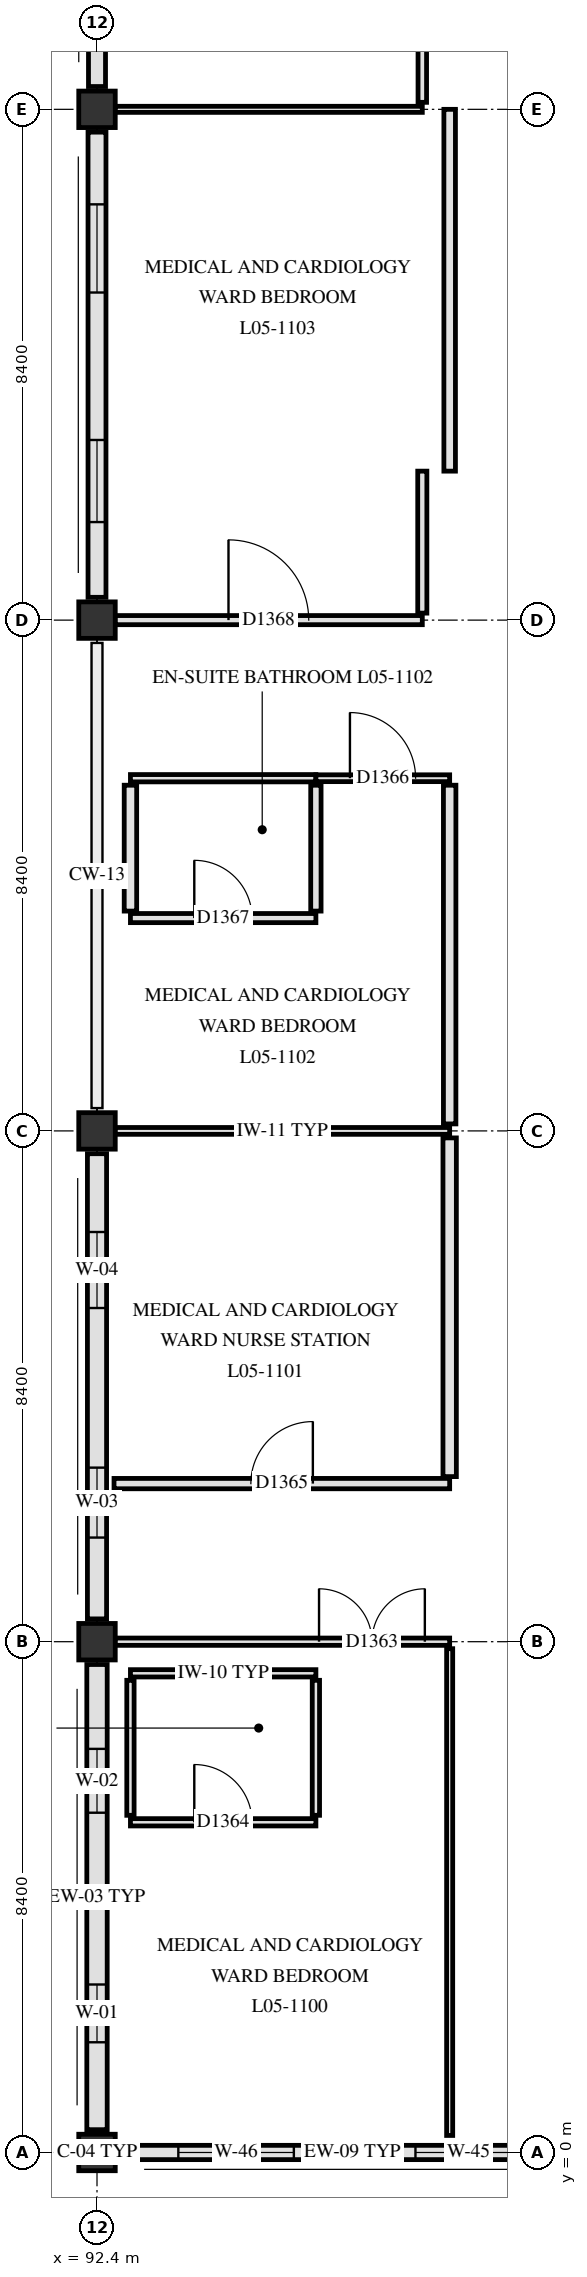
"""IFC4 building model, lengths in metres.
Left out: names, types, materials, properties, quantities, classifications, styles, units other than length and angle.
Written with IfcOpenShell. Run it as: python <this file> out.ifc"""

import sys

from ifc_helpers import new_model, si_unit, direction, frame, frame_2d, origin, origin_2d, place, context, subcontext, project, spatial, rectangle, extrude, element, fill, save


model = new_model("IFC4")
c1 = context("Model", 3, precision=1e-05, world=origin(), true_north=direction((0.0, 1.0)))
c2 = subcontext(c1, "Body", "Model", "MODEL_VIEW")
j1 = project(units=[si_unit("LENGTHUNIT", "METRE"), si_unit("PLANEANGLEUNIT", "RADIAN")], contexts=[c1])
p1 = place(None, origin())
s1 = spatial("IfcSite", under=j1, at=p1, CompositionType="ELEMENT")
p2 = place(p1, origin())
s2 = spatial("IfcBuilding", under=s1, at=p2, CompositionType="ELEMENT")
p3 = place(p2, frame((0.0, 0.0, 22.5)))
s3 = spatial("IfcBuildingStorey", under=s2, at=p3, CompositionType="ELEMENT", Elevation=22.5)
for number, where, z_axis, x_axis in (
    (1, (92.4, 0.0, 0.0), (0.0, 0.0, 1.0), (1.0, 0.0, 0.0)),
    (2, (92.4, 8.4, 0.0), (0.0, 0.0, 1.0), (1.0, 0.0, 0.0)),
    (3, (92.4, 16.8, 0.0), (0.0, 0.0, 1.0), (1.0, 0.0, 0.0)),
    (4, (92.4, 25.2, 0.0), (0.0, 0.0, 1.0), (1.0, 0.0, 0.0)),
    (5, (92.4, 33.6, 0.0), (0.0, 0.0, 1.0), (1.0, 0.0, 0.0)),
):
    element("IfcColumn", number, at=place(p3, frame(where, z_axis=z_axis, x_axis=x_axis)), inside=s3, PredefinedType="COLUMN", context=c2, shape_type="SweptSolid", body=[
        extrude(rectangle(XDim=0.6, YDim=0.6, at=origin_2d()), origin(), (0.0, 0.0, 1.0), 3.9),
    ])
p4 = place(p3, frame((100.425, 0.0, 0.0), z_axis=(0.0, 0.0, 1.0), x_axis=(-1.0, 0.0, 0.0)))
e6 = element("IfcWall", 6, at=p4, inside=s3, PredefinedType="SOLIDWALL", context=c2, shape_type="SweptSolid", body=[
    extrude(rectangle(XDim=7.65, YDim=0.235, at=frame_2d((3.825, 0.0))), origin(), (0.0, 0.0, 1.0), 3.31),
])
p5 = place(p4, frame((1.038, 0.0, 0.85)))
e7 = element("IfcOpeningElement", 7, at=p5, cuts=e6, PredefinedType="OPENING", context=c2, shape_type="SweptSolid", body=[
    extrude(rectangle(XDim=1.75, YDim=1.78, at=frame_2d((0.875, 0.89))), frame((0.0, 0.127, 0.0), z_axis=(0.0, -1.0, 0.0), x_axis=(1.0, 0.0, 0.0)), (0.0, 0.0, 1.0), 0.255),
])
p6 = place(p4, frame((4.788, 0.0, 0.85)))
e8 = element("IfcOpeningElement", 8, at=p6, cuts=e6, PredefinedType="OPENING", context=c2, shape_type="SweptSolid", body=[
    extrude(rectangle(XDim=1.9, YDim=1.78, at=frame_2d((0.95, 0.89))), frame((0.0, 0.127, 0.0), z_axis=(0.0, -1.0, 0.0), x_axis=(1.0, 0.0, 0.0)), (0.0, 0.0, 1.0), 0.255),
])
p7 = place(p3, frame((92.4, 0.375, 0.0), z_axis=(0.0, 0.0, 1.0), x_axis=(0.0, 1.0, 0.0)))
e9 = element("IfcWall", 9, at=p7, inside=s3, PredefinedType="SOLIDWALL", context=c2, shape_type="SweptSolid", body=[
    extrude(rectangle(XDim=7.65, YDim=0.335, at=frame_2d((3.825, 0.0))), origin(), (0.0, 0.0, 1.0), 3.34),
])
p8 = place(p7, frame((1.438, 0.0, 0.85)))
e10 = element("IfcOpeningElement", 10, at=p8, cuts=e9, PredefinedType="OPENING", context=c2, shape_type="SweptSolid", body=[
    extrude(rectangle(XDim=0.95, YDim=1.3, at=frame_2d((0.475, 0.65))), frame((0.0, 0.177, 0.0), z_axis=(0.0, -1.0, 0.0), x_axis=(1.0, 0.0, 0.0)), (0.0, 0.0, 1.0), 0.355),
])
p9 = place(p7, frame((5.212, 0.0, 0.85)))
e11 = element("IfcOpeningElement", 11, at=p9, cuts=e9, PredefinedType="OPENING", context=c2, shape_type="SweptSolid", body=[
    extrude(rectangle(XDim=1.05, YDim=1.3, at=frame_2d((0.525, 0.65))), frame((0.0, 0.177, 0.0), z_axis=(0.0, -1.0, 0.0), x_axis=(1.0, 0.0, 0.0)), (0.0, 0.0, 1.0), 0.355),
])
p10 = place(p3, frame((92.4, 8.775, 0.0), z_axis=(0.0, 0.0, 1.0), x_axis=(0.0, 1.0, 0.0)))
e12 = element("IfcWall", 12, at=p10, inside=s3, PredefinedType="SOLIDWALL", context=c2, shape_type="SweptSolid", body=[
    extrude(rectangle(XDim=7.65, YDim=0.315, at=frame_2d((3.825, 0.0))), origin(), (0.0, 0.0, 1.0), 3.34),
])
p11 = place(p10, frame((1.337, 0.0, 0.85)))
e13 = element("IfcOpeningElement", 13, at=p11, cuts=e12, PredefinedType="OPENING", context=c2, shape_type="SweptSolid", body=[
    extrude(rectangle(XDim=1.15, YDim=1.3, at=frame_2d((0.575, 0.65))), frame((0.0, 0.167, 0.0), z_axis=(0.0, -1.0, 0.0), x_axis=(1.0, 0.0, 0.0)), (0.0, 0.0, 1.0), 0.335),
])
p12 = place(p10, frame((5.113, 0.0, 0.85)))
e14 = element("IfcOpeningElement", 14, at=p12, cuts=e12, PredefinedType="OPENING", context=c2, shape_type="SweptSolid", body=[
    extrude(rectangle(XDim=1.25, YDim=1.3, at=frame_2d((0.625, 0.65))), frame((0.0, 0.167, 0.0), z_axis=(0.0, -1.0, 0.0), x_axis=(1.0, 0.0, 0.0)), (0.0, 0.0, 1.0), 0.335),
])
p13 = place(p3, frame((92.4, 25.575, 0.0), z_axis=(0.0, 0.0, 1.0), x_axis=(0.0, 1.0, 0.0)))
e15 = element("IfcWall", 15, at=p13, inside=s3, PredefinedType="SOLIDWALL", context=c2, shape_type="SweptSolid", body=[
    extrude(rectangle(XDim=7.65, YDim=0.295, at=frame_2d((3.825, 0.0))), origin(), (0.0, 0.0, 1.0), 3.34),
])
p14 = place(p13, frame((1.238, 0.0, 0.85)))
e16 = element("IfcOpeningElement", 16, at=p14, cuts=e15, PredefinedType="OPENING", context=c2, shape_type="SweptSolid", body=[
    extrude(rectangle(XDim=1.35, YDim=1.3, at=frame_2d((0.675, 0.65))), frame((0.0, 0.157, 0.0), z_axis=(0.0, -1.0, 0.0), x_axis=(1.0, 0.0, 0.0)), (0.0, 0.0, 1.0), 0.315),
])
p15 = place(p13, frame((5.012, 0.0, 0.85)))
e17 = element("IfcOpeningElement", 17, at=p15, cuts=e15, PredefinedType="OPENING", context=c2, shape_type="SweptSolid", body=[
    extrude(rectangle(XDim=1.45, YDim=1.3, at=frame_2d((0.725, 0.65))), frame((0.0, 0.157, 0.0), z_axis=(0.0, -1.0, 0.0), x_axis=(1.0, 0.0, 0.0)), (0.0, 0.0, 1.0), 0.315),
])
p16 = place(p3, frame((92.4, 33.975, 0.0), z_axis=(0.0, 0.0, 1.0), x_axis=(0.0, 1.0, 0.0)))
e18 = element("IfcWall", 18, at=p16, inside=s3, PredefinedType="SOLIDWALL", context=c2, shape_type="SweptSolid", body=[
    extrude(rectangle(XDim=7.65, YDim=0.28, at=frame_2d((3.825, 0.0))), origin(), (0.0, 0.0, 1.0), 3.34),
])
p17 = place(p16, frame((1.137, 0.0, 0.85)))
e19 = element("IfcOpeningElement", 19, at=p17, cuts=e18, PredefinedType="OPENING", context=c2, shape_type="SweptSolid", body=[
    extrude(rectangle(XDim=1.55, YDim=1.3, at=frame_2d((0.775, 0.65))), frame((0.0, 0.15, 0.0), z_axis=(0.0, -1.0, 0.0), x_axis=(1.0, 0.0, 0.0)), (0.0, 0.0, 1.0), 0.3),
])
p18 = place(p16, frame((4.913, 0.0, 0.85)))
e20 = element("IfcOpeningElement", 20, at=p18, cuts=e18, PredefinedType="OPENING", context=c2, shape_type="SweptSolid", body=[
    extrude(rectangle(XDim=1.65, YDim=1.3, at=frame_2d((0.825, 0.65))), frame((0.0, 0.15, 0.0), z_axis=(0.0, -1.0, 0.0), x_axis=(1.0, 0.0, 0.0)), (0.0, 0.0, 1.0), 0.3),
])
p19 = place(p3, frame((92.95, 5.43, 0.0), z_axis=(0.0, 0.0, 1.0), x_axis=(1.0, 0.0, 0.0)))
e21 = element("IfcWall", 21, at=p19, inside=s3, PredefinedType="PARTITIONING", context=c2, shape_type="SweptSolid", body=[
    extrude(rectangle(XDim=3.05, YDim=0.12, at=frame_2d((1.525, 0.0))), origin(), (0.0, 0.0, 1.0), 3.61),
])
p20 = place(p19, frame((1.05, 0.0, 0.0)))
e22 = element("IfcOpeningElement", 22, at=p20, cuts=e21, PredefinedType="OPENING", context=c2, shape_type="SweptSolid", body=[
    extrude(rectangle(XDim=0.95, YDim=2.1, at=frame_2d((0.475, 1.05))), frame((0.0, 0.07, 0.0), z_axis=(0.0, -1.0, 0.0), x_axis=(1.0, 0.0, 0.0)), (0.0, 0.0, 1.0), 0.14),
])
p21 = place(p3, frame((92.95, 7.88, 0.0), z_axis=(0.0, 0.0, 1.0), x_axis=(1.0, 0.0, 0.0)))
e23 = element("IfcWall", 23, at=p21, inside=s3, PredefinedType="PARTITIONING", context=c2, shape_type="SweptSolid", body=[
    extrude(rectangle(XDim=3.05, YDim=0.12, at=frame_2d((1.525, 0.0))), origin(), (0.0, 0.0, 1.0), 3.61),
])
p22 = place(p3, frame((92.695, 8.4, 0.0), z_axis=(0.0, 0.0, 1.0), x_axis=(1.0, 0.0, 0.0)))
e24 = element("IfcWall", 24, at=p22, inside=s3, PredefinedType="PARTITIONING", context=c2, shape_type="SweptSolid", body=[
    extrude(rectangle(XDim=5.505, YDim=0.12, at=frame_2d((2.752, 0.0))), origin(), (0.0, 0.0, 1.0), 3.16),
])
p23 = place(p22, frame((3.357, 0.0, 0.0)))
e25 = element("IfcOpeningElement", 25, at=p23, cuts=e24, PredefinedType="OPENING", context=c2, shape_type="SweptSolid", body=[
    extrude(rectangle(XDim=1.74, YDim=2.24, at=frame_2d((0.87, 1.12))), frame((0.0, 0.07, 0.0), z_axis=(0.0, -1.0, 0.0), x_axis=(1.0, 0.0, 0.0)), (0.0, 0.0, 1.0), 0.14),
])
p24 = place(p3, frame((92.68, 11.0, 0.0), z_axis=(0.0, 0.0, 1.0), x_axis=(1.0, 0.0, 0.0)))
e26 = element("IfcWall", 26, at=p24, inside=s3, PredefinedType="PARTITIONING", context=c2, shape_type="SweptSolid", body=[
    extrude(rectangle(XDim=5.52, YDim=0.17, at=frame_2d((2.76, 0.0))), origin(), (0.0, 0.0, 1.0), 3.61),
])
p25 = place(p24, frame((2.25, 0.0, 0.0)))
e27 = element("IfcOpeningElement", 27, at=p25, cuts=e26, PredefinedType="OPENING", context=c2, shape_type="SweptSolid", body=[
    extrude(rectangle(XDim=1.02, YDim=2.12, at=frame_2d((0.51, 1.06))), frame((0.0, 0.095, 0.0), z_axis=(0.0, -1.0, 0.0), x_axis=(1.0, 0.0, 0.0)), (0.0, 0.0, 1.0), 0.19),
])
p26 = place(p3, frame((92.695, 16.8, 0.0), z_axis=(0.0, 0.0, 1.0), x_axis=(1.0, 0.0, 0.0)))
e28 = element("IfcWall", 28, at=p26, inside=s3, PredefinedType="PARTITIONING", context=c2, shape_type="SweptSolid", body=[
    extrude(rectangle(XDim=5.505, YDim=0.112, at=frame_2d((2.752, 0.0))), origin(), (0.0, 0.0, 1.0), 3.16),
])
p27 = place(p3, frame((92.95, 20.3, 0.0), z_axis=(0.0, 0.0, 1.0), x_axis=(1.0, 0.0, 0.0)))
e29 = element("IfcWall", 29, at=p27, inside=s3, PredefinedType="PARTITIONING", context=c2, shape_type="SweptSolid", body=[
    extrude(rectangle(XDim=3.05, YDim=0.15, at=frame_2d((1.525, 0.0))), origin(), (0.0, 0.0, 1.0), 3.61),
])
p28 = place(p27, frame((1.05, 0.0, 0.0)))
e30 = element("IfcOpeningElement", 30, at=p28, cuts=e29, PredefinedType="OPENING", context=c2, shape_type="SweptSolid", body=[
    extrude(rectangle(XDim=0.95, YDim=2.1, at=frame_2d((0.475, 1.05))), frame((0.0, 0.085, 0.0), z_axis=(0.0, -1.0, 0.0), x_axis=(1.0, 0.0, 0.0)), (0.0, 0.0, 1.0), 0.17),
])
p29 = place(p3, frame((92.95, 22.6, 0.0), z_axis=(0.0, 0.0, 1.0), x_axis=(1.0, 0.0, 0.0)))
e31 = element("IfcWall", 31, at=p29, inside=s3, PredefinedType="PARTITIONING", context=c2, shape_type="SweptSolid", body=[
    extrude(rectangle(XDim=3.05, YDim=0.12, at=frame_2d((1.525, 0.0))), origin(), (0.0, 0.0, 1.0), 3.61),
])
p30 = place(p3, frame((96.0, 22.6, 0.0), z_axis=(0.0, 0.0, 1.0), x_axis=(1.0, 0.0, 0.0)))
e32 = element("IfcWall", 32, at=p30, inside=s3, PredefinedType="PARTITIONING", context=c2, shape_type="SweptSolid", body=[
    extrude(rectangle(XDim=2.2, YDim=0.112, at=frame_2d((1.1, 0.0))), origin(), (0.0, 0.0, 1.0), 3.61),
])
p31 = place(p30, frame((0.56, 0.0, 0.0)))
e33 = element("IfcOpeningElement", 33, at=p31, cuts=e32, PredefinedType="OPENING", context=c2, shape_type="SweptSolid", body=[
    extrude(rectangle(XDim=1.08, YDim=2.12, at=frame_2d((0.54, 1.06))), frame((0.0, 0.066, 0.0), z_axis=(0.0, -1.0, 0.0), x_axis=(1.0, 0.0, 0.0)), (0.0, 0.0, 1.0), 0.132),
])
p32 = place(p3, frame((92.695, 25.2, 0.0), z_axis=(0.0, 0.0, 1.0), x_axis=(1.0, 0.0, 0.0)))
e34 = element("IfcWall", 34, at=p32, inside=s3, PredefinedType="PARTITIONING", context=c2, shape_type="SweptSolid", body=[
    extrude(rectangle(XDim=5.055, YDim=0.15, at=frame_2d((2.527, 0.0))), origin(), (0.0, 0.0, 1.0), 3.16),
])
p33 = place(p32, frame((1.867, 0.0, 0.0)))
e35 = element("IfcOpeningElement", 35, at=p33, cuts=e34, PredefinedType="OPENING", context=c2, shape_type="SweptSolid", body=[
    extrude(rectangle(XDim=1.32, YDim=2.18, at=frame_2d((0.66, 1.09))), frame((0.0, 0.085, 0.0), z_axis=(0.0, -1.0, 0.0), x_axis=(1.0, 0.0, 0.0)), (0.0, 0.0, 1.0), 0.17),
])
p34 = place(p3, frame((92.695, 33.6, 0.0), z_axis=(0.0, 0.0, 1.0), x_axis=(1.0, 0.0, 0.0)))
e36 = element("IfcWall", 36, at=p34, inside=s3, PredefinedType="PARTITIONING", context=c2, shape_type="SweptSolid", body=[
    extrude(rectangle(XDim=5.055, YDim=0.1, at=frame_2d((2.527, 0.0))), origin(), (0.0, 0.0, 1.0), 3.16),
])
p35 = place(p3, frame((92.95, 5.545, 0.0), z_axis=(0.0, 0.0, 1.0), x_axis=(0.0, 1.0, 0.0)))
e37 = element("IfcWall", 37, at=p35, inside=s3, PredefinedType="PARTITIONING", context=c2, shape_type="SweptSolid", body=[
    extrude(rectangle(XDim=2.22, YDim=0.12, at=frame_2d((1.11, 0.0))), origin(), (0.0, 0.0, 1.0), 3.34),
])
p36 = place(p3, frame((92.95, 20.415, 0.0), z_axis=(0.0, 0.0, 1.0), x_axis=(0.0, 1.0, 0.0)))
e38 = element("IfcWall", 38, at=p36, inside=s3, PredefinedType="PARTITIONING", context=c2, shape_type="SweptSolid", body=[
    extrude(rectangle(XDim=2.07, YDim=0.205, at=frame_2d((1.035, 0.0))), origin(), (0.0, 0.0, 1.0), 3.34),
])
p37 = place(p3, frame((96.0, 5.545, 0.0), z_axis=(0.0, 0.0, 1.0), x_axis=(0.0, 1.0, 0.0)))
e39 = element("IfcWall", 39, at=p37, inside=s3, PredefinedType="PARTITIONING", context=c2, shape_type="SweptSolid", body=[
    extrude(rectangle(XDim=2.22, YDim=0.12, at=frame_2d((1.11, 0.0))), origin(), (0.0, 0.0, 1.0), 3.34),
])
p38 = place(p3, frame((96.0, 20.415, 0.0), z_axis=(0.0, 0.0, 1.0), x_axis=(0.0, 1.0, 0.0)))
e40 = element("IfcWall", 40, at=p38, inside=s3, PredefinedType="PARTITIONING", context=c2, shape_type="SweptSolid", body=[
    extrude(rectangle(XDim=2.07, YDim=0.17, at=frame_2d((1.035, 0.0))), origin(), (0.0, 0.0, 1.0), 3.34),
])
p39 = place(p3, frame((97.75, 25.315, 0.0), z_axis=(0.0, 0.0, 1.0), x_axis=(0.0, 1.0, 0.0)))
e41 = element("IfcWall", 41, at=p39, inside=s3, PredefinedType="PARTITIONING", context=c2, shape_type="SweptSolid", body=[
    extrude(rectangle(XDim=2.335, YDim=0.15, at=frame_2d((1.167, 0.0))), origin(), (0.0, 0.0, 1.0), 3.61),
])
p40 = place(p3, frame((97.75, 33.715, 0.0), z_axis=(0.0, 0.0, 1.0), x_axis=(0.0, 1.0, 0.0)))
e42 = element("IfcWall", 42, at=p40, inside=s3, PredefinedType="PARTITIONING", context=c2, shape_type="SweptSolid", body=[
    extrude(rectangle(XDim=2.335, YDim=0.14, at=frame_2d((1.167, 0.0))), origin(), (0.0, 0.0, 1.0), 3.61),
])
p41 = place(p3, frame((98.2, 0.28, 0.0), z_axis=(0.0, 0.0, 1.0), x_axis=(0.0, 1.0, 0.0)))
e43 = element("IfcWall", 43, at=p41, inside=s3, PredefinedType="PARTITIONING", context=c2, shape_type="SweptSolid", body=[
    extrude(rectangle(XDim=8.005, YDim=0.1, at=frame_2d((4.002, 0.0))), origin(), (0.0, 0.0, 1.0), 3.34),
])
p42 = place(p3, frame((98.2, 11.115, 0.0), z_axis=(0.0, 0.0, 1.0), x_axis=(0.0, 1.0, 0.0)))
e44 = element("IfcWall", 44, at=p42, inside=s3, PredefinedType="PARTITIONING", context=c2, shape_type="SweptSolid", body=[
    extrude(rectangle(XDim=5.57, YDim=0.22, at=frame_2d((2.785, 0.0))), origin(), (0.0, 0.0, 1.0), 3.34),
])
p43 = place(p3, frame((98.2, 16.915, 0.0), z_axis=(0.0, 0.0, 1.0), x_axis=(0.0, 1.0, 0.0)))
e45 = element("IfcWall", 45, at=p43, inside=s3, PredefinedType="PARTITIONING", context=c2, shape_type="SweptSolid", body=[
    extrude(rectangle(XDim=5.57, YDim=0.205, at=frame_2d((2.785, 0.0))), origin(), (0.0, 0.0, 1.0), 3.34),
])
p44 = place(p3, frame((98.2, 27.65, 0.0), z_axis=(0.0, 0.0, 1.0), x_axis=(0.0, 1.0, 0.0)))
e46 = element("IfcWall", 46, at=p44, inside=s3, PredefinedType="PARTITIONING", context=c2, shape_type="SweptSolid", body=[
    extrude(rectangle(XDim=5.95, YDim=0.19, at=frame_2d((2.975, 0.0))), origin(), (0.0, 0.0, 1.0), 3.16),
])
p45 = place(p5, origin())
e47 = element("IfcWindow", 47, at=p45, inside=s3, PartitioningType="SINGLE_PANEL", PredefinedType="WINDOW", context=c2, shape_type="SweptSolid", body=[
    extrude(rectangle(XDim=1.75, YDim=1.78, at=frame_2d((0.875, 0.89))), frame((0.0, 0.03, 0.0), z_axis=(0.0, -1.0, 0.0), x_axis=(1.0, 0.0, 0.0)), (0.0, 0.0, 1.0), 0.06),
])
fill(e7, e47)
p46 = place(p6, origin())
e48 = element("IfcWindow", 48, at=p46, inside=s3, PartitioningType="SINGLE_PANEL", PredefinedType="WINDOW", context=c2, shape_type="SweptSolid", body=[
    extrude(rectangle(XDim=1.9, YDim=1.78, at=frame_2d((0.95, 0.89))), frame((0.0, 0.03, 0.0), z_axis=(0.0, -1.0, 0.0), x_axis=(1.0, 0.0, 0.0)), (0.0, 0.0, 1.0), 0.06),
])
fill(e8, e48)
p47 = place(p8, origin())
e49 = element("IfcWindow", 49, at=p47, inside=s3, PartitioningType="SINGLE_PANEL", PredefinedType="WINDOW", context=c2, shape_type="SweptSolid", body=[
    extrude(rectangle(XDim=0.95, YDim=1.3, at=frame_2d((0.475, 0.65))), frame((0.0, 0.03, 0.0), z_axis=(0.0, -1.0, 0.0), x_axis=(1.0, 0.0, 0.0)), (0.0, 0.0, 1.0), 0.06),
])
fill(e10, e49)
p48 = place(p9, origin())
e50 = element("IfcWindow", 50, at=p48, inside=s3, PartitioningType="SINGLE_PANEL", PredefinedType="WINDOW", context=c2, shape_type="SweptSolid", body=[
    extrude(rectangle(XDim=1.05, YDim=1.3, at=frame_2d((0.525, 0.65))), frame((0.0, 0.03, 0.0), z_axis=(0.0, -1.0, 0.0), x_axis=(1.0, 0.0, 0.0)), (0.0, 0.0, 1.0), 0.06),
])
fill(e11, e50)
p49 = place(p11, origin())
e51 = element("IfcWindow", 51, at=p49, inside=s3, PartitioningType="SINGLE_PANEL", PredefinedType="WINDOW", context=c2, shape_type="SweptSolid", body=[
    extrude(rectangle(XDim=1.15, YDim=1.3, at=frame_2d((0.575, 0.65))), frame((0.0, 0.03, 0.0), z_axis=(0.0, -1.0, 0.0), x_axis=(1.0, 0.0, 0.0)), (0.0, 0.0, 1.0), 0.06),
])
fill(e13, e51)
p50 = place(p12, origin())
e52 = element("IfcWindow", 52, at=p50, inside=s3, PartitioningType="SINGLE_PANEL", PredefinedType="WINDOW", context=c2, shape_type="SweptSolid", body=[
    extrude(rectangle(XDim=1.25, YDim=1.3, at=frame_2d((0.625, 0.65))), frame((0.0, 0.03, 0.0), z_axis=(0.0, -1.0, 0.0), x_axis=(1.0, 0.0, 0.0)), (0.0, 0.0, 1.0), 0.06),
])
fill(e14, e52)
p51 = place(p14, origin())
e53 = element("IfcWindow", 53, at=p51, inside=s3, PartitioningType="SINGLE_PANEL", PredefinedType="WINDOW", context=c2, shape_type="SweptSolid", body=[
    extrude(rectangle(XDim=1.35, YDim=1.3, at=frame_2d((0.675, 0.65))), frame((0.0, 0.03, 0.0), z_axis=(0.0, -1.0, 0.0), x_axis=(1.0, 0.0, 0.0)), (0.0, 0.0, 1.0), 0.06),
])
fill(e16, e53)
p52 = place(p15, origin())
e54 = element("IfcWindow", 54, at=p52, inside=s3, PartitioningType="SINGLE_PANEL", PredefinedType="WINDOW", context=c2, shape_type="SweptSolid", body=[
    extrude(rectangle(XDim=1.45, YDim=1.3, at=frame_2d((0.725, 0.65))), frame((0.0, 0.03, 0.0), z_axis=(0.0, -1.0, 0.0), x_axis=(1.0, 0.0, 0.0)), (0.0, 0.0, 1.0), 0.06),
])
fill(e17, e54)
p53 = place(p23, origin())
e55 = element("IfcDoor", 55, at=p53, inside=s3, OperationType="DOUBLE_SWING_RIGHT", PredefinedType="DOOR", context=c2, shape_type="SweptSolid", body=[
    extrude(rectangle(XDim=1.74, YDim=2.24, at=frame_2d((0.87, 1.12))), frame((0.0, 0.025, 0.0), z_axis=(0.0, -1.0, 0.0), x_axis=(1.0, 0.0, 0.0)), (0.0, 0.0, 1.0), 0.05),
])
fill(e25, e55)
p54 = place(p20, origin())
e56 = element("IfcDoor", 56, at=p54, inside=s3, OperationType="SINGLE_SWING_LEFT", PredefinedType="DOOR", context=c2, shape_type="SweptSolid", body=[
    extrude(rectangle(XDim=0.95, YDim=2.1, at=frame_2d((0.475, 1.05))), frame((0.0, 0.025, 0.0), z_axis=(0.0, -1.0, 0.0), x_axis=(1.0, 0.0, 0.0)), (0.0, 0.0, 1.0), 0.05),
])
fill(e22, e56)
p55 = place(p25, origin())
e57 = element("IfcDoor", 57, at=p55, inside=s3, OperationType="SINGLE_SWING_RIGHT", PredefinedType="DOOR", context=c2, shape_type="SweptSolid", body=[
    extrude(rectangle(XDim=1.02, YDim=2.12, at=frame_2d((0.51, 1.06))), frame((0.0, 0.025, 0.0), z_axis=(0.0, -1.0, 0.0), x_axis=(1.0, 0.0, 0.0)), (0.0, 0.0, 1.0), 0.05),
])
fill(e27, e57)
p56 = place(p31, origin())
e58 = element("IfcDoor", 58, at=p56, inside=s3, OperationType="SINGLE_SWING_LEFT", PredefinedType="DOOR", context=c2, shape_type="SweptSolid", body=[
    extrude(rectangle(XDim=1.08, YDim=2.12, at=frame_2d((0.54, 1.06))), frame((0.0, 0.025, 0.0), z_axis=(0.0, -1.0, 0.0), x_axis=(1.0, 0.0, 0.0)), (0.0, 0.0, 1.0), 0.05),
])
fill(e33, e58)
p57 = place(p28, origin())
e59 = element("IfcDoor", 59, at=p57, inside=s3, OperationType="SINGLE_SWING_LEFT", PredefinedType="DOOR", context=c2, shape_type="SweptSolid", body=[
    extrude(rectangle(XDim=0.95, YDim=2.1, at=frame_2d((0.475, 1.05))), frame((0.0, 0.025, 0.0), z_axis=(0.0, -1.0, 0.0), x_axis=(1.0, 0.0, 0.0)), (0.0, 0.0, 1.0), 0.05),
])
fill(e30, e59)
p58 = place(p33, origin())
e60 = element("IfcDoor", 60, at=p58, inside=s3, OperationType="SINGLE_SWING_LEFT", PredefinedType="DOOR", context=c2, shape_type="SweptSolid", body=[
    extrude(rectangle(XDim=1.32, YDim=2.18, at=frame_2d((0.66, 1.09))), frame((0.0, 0.025, 0.0), z_axis=(0.0, -1.0, 0.0), x_axis=(1.0, 0.0, 0.0)), (0.0, 0.0, 1.0), 0.05),
])
fill(e35, e60)
save(model, sys.argv[1])
